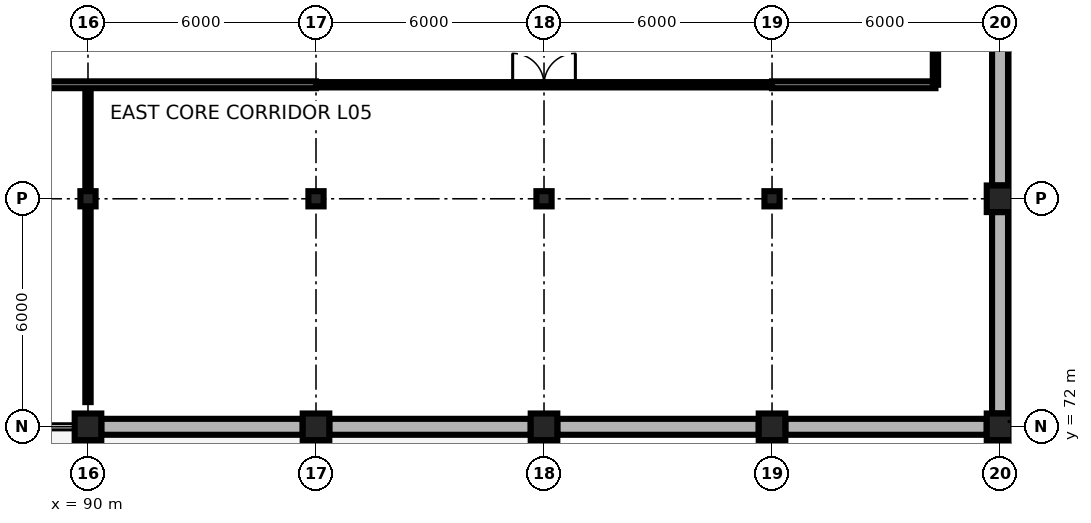
"""IFC4 building model, lengths in metres.
Left out: names, types, materials, properties, quantities, classifications, styles, units other than length and angle.
Written with IfcOpenShell. Run it as: python <this file> out.ifc"""

import sys

from ifc_helpers import new_model, si_unit, direction, frame, frame_2d, origin, origin_2d, place, context, subcontext, project, spatial, rectangle, i_section, extrude, element, fill, save


model = new_model("IFC4")
c1 = context("Model", 3, precision=1e-05, world=origin(), true_north=direction((0.0, 1.0)))
c2 = subcontext(c1, "Body", "Model", "MODEL_VIEW")
j1 = project(units=[si_unit("LENGTHUNIT", "METRE"), si_unit("PLANEANGLEUNIT", "RADIAN")], contexts=[c1])
p1 = place(None, origin())
s1 = spatial("IfcSite", under=j1, at=p1, CompositionType="ELEMENT")
p2 = place(p1, origin())
s2 = spatial("IfcBuilding", under=s1, at=p2, CompositionType="ELEMENT")
p3 = place(p2, frame((0.0, 0.0, 21.0)))
s3 = spatial("IfcBuildingStorey", under=s2, at=p3, CompositionType="ELEMENT", Elevation=21.0)
for number, where, z_axis, x_axis in (
    (1, (90.0, 72.0, 0.0), (0.0, 0.0, 1.0), (1.0, 0.0, 0.0)),
    (2, (96.0, 72.0, 0.0), (0.0, 0.0, 1.0), (1.0, 0.0, 0.0)),
    (3, (102.0, 72.0, 0.0), (0.0, 0.0, 1.0), (1.0, 0.0, 0.0)),
    (4, (108.0, 72.0, 0.0), (0.0, 0.0, 1.0), (1.0, 0.0, 0.0)),
    (5, (114.0, 72.0, 0.0), (0.0, 0.0, 1.0), (1.0, 0.0, 0.0)),
):
    element("IfcColumn", number, at=place(p3, frame(where, z_axis=z_axis, x_axis=x_axis)), inside=s3, PredefinedType="COLUMN", context=c2, shape_type="SweptSolid", body=[
        extrude(rectangle(XDim=0.7, YDim=0.7, at=origin_2d()), origin(), (0.0, 0.0, 1.0), 3.9),
    ])
for number, where, z_axis, x_axis in (
    (6, (90.0, 78.0, 0.0), (0.0, 0.0, 1.0), (1.0, 0.0, 0.0)),
    (7, (96.0, 78.0, 0.0), (0.0, 0.0, 1.0), (1.0, 0.0, 0.0)),
    (8, (102.0, 78.0, 0.0), (0.0, 0.0, 1.0), (1.0, 0.0, 0.0)),
    (9, (108.0, 78.0, 0.0), (0.0, 0.0, 1.0), (1.0, 0.0, 0.0)),
):
    element("IfcColumn", number, at=place(p3, frame(where, z_axis=z_axis, x_axis=x_axis)), inside=s3, PredefinedType="COLUMN", context=c2, shape_type="SweptSolid", body=[
        extrude(i_section(OverallWidth=0.4, OverallDepth=0.4, WebThickness=0.013, FlangeThickness=0.021, FilletRadius=0.022, at=origin_2d()), origin(), (0.0, 0.0, 1.0), 3.9),
    ])
p4 = place(p3, frame((114.0, 78.0, 0.0), z_axis=(0.0, 0.0, 1.0), x_axis=(1.0, 0.0, 0.0)))
e10 = element("IfcColumn", 10, at=p4, inside=s3, PredefinedType="COLUMN", context=c2, shape_type="SweptSolid", body=[
    extrude(rectangle(XDim=0.7, YDim=0.7, at=origin_2d()), origin(), (0.0, 0.0, 1.0), 3.9),
])
for number, where, z_axis, x_axis in (
    (11, (90.35, 72.0, 0.0), (0.0, 0.0, 1.0), (1.0, 0.0, 0.0)),
    (12, (96.35, 72.0, 0.0), (0.0, 0.0, 1.0), (1.0, 0.0, 0.0)),
    (13, (102.35, 72.0, 0.0), (0.0, 0.0, 1.0), (1.0, 0.0, 0.0)),
    (14, (108.35, 72.0, 0.0), (0.0, 0.0, 1.0), (1.0, 0.0, 0.0)),
    (15, (114.0, 72.35, 0.0), (0.0, 0.0, 1.0), (0.0, 1.0, 0.0)),
    (16, (114.0, 78.35, 0.0), (0.0, 0.0, 1.0), (0.0, 1.0, 0.0)),
):
    element("IfcWall", number, at=place(p3, frame(where, z_axis=z_axis, x_axis=x_axis)), inside=s3, PredefinedType="SOLIDWALL", context=c2, shape_type="SweptSolid", body=[
        extrude(rectangle(XDim=5.3, YDim=0.42, at=frame_2d((2.65, 0.0))), origin(), (0.0, 0.0, 1.0), 3.28),
    ])
p5 = place(p3, frame((96.0, 81.0, 0.0), z_axis=(0.0, 0.0, 1.0), x_axis=(1.0, 0.0, 0.0)))
e17 = element("IfcWall", 17, at=p5, inside=s3, PredefinedType="PARTITIONING", context=c2, shape_type="SweptSolid", body=[
    extrude(rectangle(XDim=12.0, YDim=0.14, at=frame_2d((6.0, 0.0))), origin(), (0.0, 0.0, 1.0), 3.7),
])
p6 = place(p5, frame((5.175, 0.0, 0.0)))
e18 = element("IfcOpeningElement", 18, at=p6, cuts=e17, PredefinedType="OPENING", context=c2, shape_type="SweptSolid", body=[
    extrude(rectangle(XDim=1.65, YDim=2.35, at=frame_2d((0.825, 1.175))), frame((0.0, 0.085, 0.0), z_axis=(0.0, -1.0, 0.0), x_axis=(1.0, 0.0, 0.0)), (0.0, 0.0, 1.0), 0.17),
])
p7 = place(p3, frame((90.0, 72.65, 0.0), z_axis=(0.0, 0.0, 1.0), x_axis=(0.0, 1.0, 0.0)))
e19 = element("IfcWall", 19, at=p7, inside=s3, PredefinedType="PARTITIONING", context=c2, shape_type="SweptSolid", body=[
    extrude(rectangle(XDim=8.35, YDim=0.14, at=frame_2d((4.175, 0.0))), origin(), (0.0, 0.0, 1.0), 3.312),
])
p8 = place(p3, frame((72.0, 81.0, 0.0), z_axis=(0.0, 0.0, 1.0), x_axis=(1.0, 0.0, 0.0)))
e20 = element("IfcWall", 20, at=p8, inside=s3, PredefinedType="PARTITIONING", context=c2, shape_type="SweptSolid", body=[
    extrude(rectangle(XDim=24.0, YDim=0.18, at=frame_2d((12.0, 0.0))), origin(), (0.0, 0.0, 1.0), 3.7),
])
p9 = place(p3, frame((108.0, 81.0, 0.0), z_axis=(0.0, 0.0, 1.0), x_axis=(1.0, 0.0, 0.0)))
e21 = element("IfcWall", 21, at=p9, inside=s3, PredefinedType="PARTITIONING", context=c2, shape_type="SweptSolid", body=[
    extrude(rectangle(XDim=4.3, YDim=0.18, at=frame_2d((2.15, 0.0))), origin(), (0.0, 0.0, 1.0), 3.7),
])
p10 = place(p3, frame((112.3, 81.0, 0.0), z_axis=(0.0, 0.0, 1.0), x_axis=(0.0, 1.0, 0.0)))
e22 = element("IfcWall", 22, at=p10, inside=s3, PredefinedType="PARTITIONING", context=c2, shape_type="SweptSolid", body=[
    extrude(rectangle(XDim=1.15, YDim=0.14, at=frame_2d((0.575, 0.0))), origin(), (0.0, 0.0, 1.0), 3.7),
])
p11 = place(p6, origin())
e23 = element("IfcDoor", 23, at=p11, inside=s3, OperationType="DOUBLE_DOOR_SINGLE_SWING", PredefinedType="DOOR", context=c2, shape_type="SweptSolid", body=[
    extrude(rectangle(XDim=1.65, YDim=2.35, at=frame_2d((0.825, 1.175))), frame((0.0, 0.025, 0.0), z_axis=(0.0, -1.0, 0.0), x_axis=(1.0, 0.0, 0.0)), (0.0, 0.0, 1.0), 0.05),
])
fill(e18, e23)
save(model, sys.argv[1])
